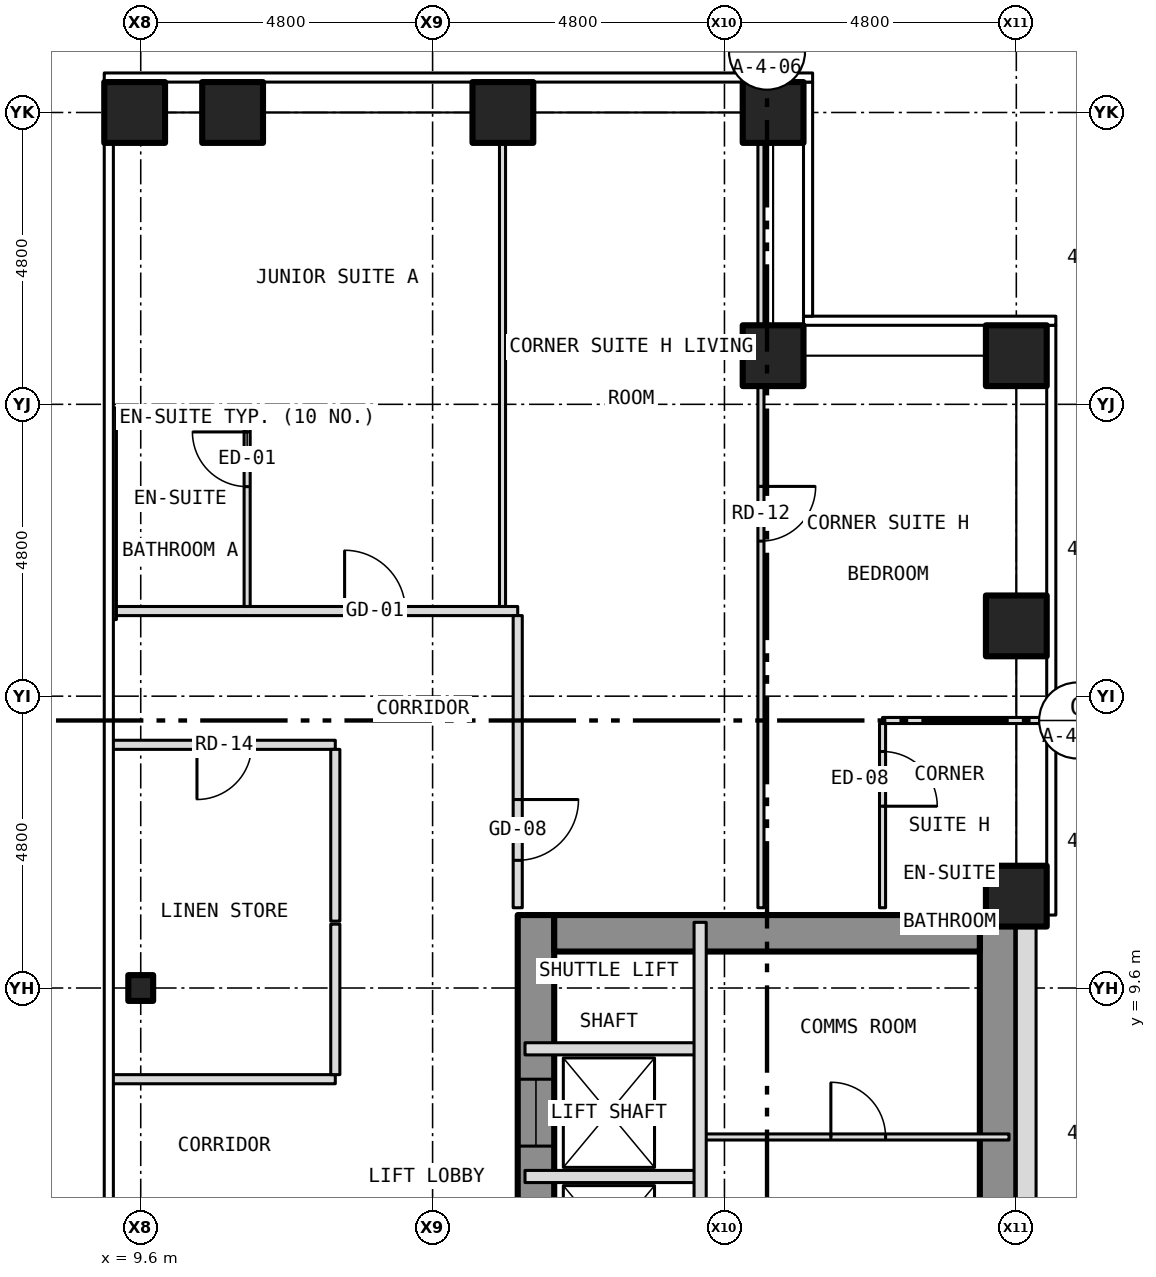
"""IFC4 building model, lengths in metres.
Left out: names, types, materials, properties, quantities, classifications, styles, units other than length and angle.
Written with IfcOpenShell. Run it as: python <this file> out.ifc"""

import sys

from ifc_helpers import new_model, si_unit, direction, frame, frame_2d, origin, origin_2d, place, context, subcontext, project, spatial, rectangle, hollow_rectangle, i_section, extrude, element, fill, save


model = new_model("IFC4")
c1 = context("Model", 3, precision=1e-05, world=origin(), true_north=direction((0.0, 1.0)))
c2 = subcontext(c1, "Body", "Model", "MODEL_VIEW")
j1 = project(units=[si_unit("LENGTHUNIT", "METRE"), si_unit("PLANEANGLEUNIT", "RADIAN")], contexts=[c1])
p1 = place(None, origin())
s1 = spatial("IfcSite", under=j1, at=p1, CompositionType="ELEMENT")
p2 = place(p1, origin())
s2 = spatial("IfcBuilding", under=s1, at=p2, CompositionType="ELEMENT")
p3 = place(p2, frame((0.0, 0.0, 77.5)))
s3 = spatial("IfcBuildingStorey", under=s2, at=p3, CompositionType="ELEMENT", Elevation=77.5)
for number, where, z_axis, x_axis in (
    (1, (11.111, 24.0, -0.15), (0.0, 0.0, 1.0), (1.0, 0.0, 0.0)),
    (2, (15.556, 24.0, -0.15), (0.0, 0.0, 1.0), (1.0, 0.0, 0.0)),
    (3, (20.0, 24.0, -0.15), (0.0, 0.0, 1.0), (1.0, 0.0, 0.0)),
    (4, (24.0, 11.111, -0.15), (0.0, 0.0, 1.0), (1.0, 0.0, 0.0)),
    (5, (24.0, 15.556, -0.15), (0.0, 0.0, 1.0), (1.0, 0.0, 0.0)),
    (6, (24.0, 20.0, -0.15), (0.0, 0.0, 1.0), (1.0, 0.0, 0.0)),
    (7, (20.0, 20.0, -0.15), (0.0, 0.0, 1.0), (1.0, 0.0, 0.0)),
    (8, (9.5, 24.0, -0.15), (0.0, 0.0, 1.0), (1.0, 0.0, 0.0)),
):
    element("IfcColumn", number, at=place(p3, frame(where, z_axis=z_axis, x_axis=x_axis)), inside=s3, PredefinedType="COLUMN", context=c2, shape_type="SweptSolid", body=[
        extrude(hollow_rectangle(XDim=1.0, YDim=1.0, WallThickness=0.06, at=origin_2d()), origin(), (0.0, 0.0, 1.0), 3.5),
    ])
p4 = place(p3, frame((9.6, 9.6, -0.15), z_axis=(0.0, 0.0, 1.0), x_axis=(1.0, 0.0, 0.0)))
e9 = element("IfcColumn", 9, at=p4, inside=s3, PredefinedType="COLUMN", context=c2, shape_type="SweptSolid", body=[
    extrude(i_section(OverallWidth=0.409, OverallDepth=0.424, WebThickness=0.033, FlangeThickness=0.052, at=origin_2d()), origin(), (0.0, 0.0, 1.0), 3.5),
])
p5 = place(p3, frame((16.1, -10.8, 0.0), z_axis=(0.0, 0.0, 1.0), x_axis=(0.0, 1.0, 0.0)))
e10 = element("IfcWall", 10, at=p5, inside=s3, PredefinedType="SHEAR", context=c2, shape_type="SweptSolid", body=[
    extrude(rectangle(XDim=21.6, YDim=0.6, at=frame_2d((10.8, 0.0))), origin(), (0.0, 0.0, 1.0), 3.25),
])
p6 = place(p5, frame((9.4, 0.0, 0.0)))
e11 = element("IfcOpeningElement", 11, at=p6, cuts=e10, PredefinedType="OPENING", context=c2, shape_type="SweptSolid", body=[
    extrude(rectangle(XDim=1.1, YDim=2.1, at=frame_2d((0.55, 1.05))), frame((0.0, 0.312, 0.0), z_axis=(0.0, -1.0, 0.0), x_axis=(1.0, 0.0, 0.0)), (0.0, 0.0, 1.0), 0.624),
])
p7 = place(p5, frame((11.5, 0.0, 0.0)))
e12 = element("IfcOpeningElement", 12, at=p7, cuts=e10, PredefinedType="OPENING", context=c2, shape_type="SweptSolid", body=[
    extrude(rectangle(XDim=1.1, YDim=2.1, at=frame_2d((0.55, 1.05))), frame((0.0, 0.312, 0.0), z_axis=(0.0, -1.0, 0.0), x_axis=(1.0, 0.0, 0.0)), (0.0, 0.0, 1.0), 0.624),
])
p8 = place(p5, frame((13.6, 0.0, 0.0)))
e13 = element("IfcOpeningElement", 13, at=p8, cuts=e10, PredefinedType="OPENING", context=c2, shape_type="SweptSolid", body=[
    extrude(rectangle(XDim=1.1, YDim=2.1, at=frame_2d((0.55, 1.05))), frame((0.0, 0.312, 0.0), z_axis=(0.0, -1.0, 0.0), x_axis=(1.0, 0.0, 0.0)), (0.0, 0.0, 1.0), 0.624),
])
p9 = place(p5, frame((15.7, 0.0, 0.0)))
e14 = element("IfcOpeningElement", 14, at=p9, cuts=e10, PredefinedType="OPENING", context=c2, shape_type="SweptSolid", body=[
    extrude(rectangle(XDim=1.1, YDim=2.1, at=frame_2d((0.55, 1.05))), frame((0.0, 0.312, 0.0), z_axis=(0.0, -1.0, 0.0), x_axis=(1.0, 0.0, 0.0)), (0.0, 0.0, 1.0), 0.624),
])
p10 = place(p5, frame((17.8, 0.0, 0.0)))
e15 = element("IfcOpeningElement", 15, at=p10, cuts=e10, PredefinedType="OPENING", context=c2, shape_type="SweptSolid", body=[
    extrude(rectangle(XDim=1.1, YDim=2.1, at=frame_2d((0.55, 1.05))), frame((0.0, 0.312, 0.0), z_axis=(0.0, -1.0, 0.0), x_axis=(1.0, 0.0, 0.0)), (0.0, 0.0, 1.0), 0.624),
])
p11 = place(p5, frame((5.642, 0.0, 0.0)))
e16 = element("IfcOpeningElement", 16, at=p11, cuts=e10, PredefinedType="OPENING", context=c2, shape_type="SweptSolid", body=[
    extrude(rectangle(XDim=1.1, YDim=2.1, at=frame_2d((0.55, 1.05))), frame((0.0, 0.312, 0.0), z_axis=(0.0, -1.0, 0.0), x_axis=(1.0, 0.0, 0.0)), (0.0, 0.0, 1.0), 0.624),
])
p12 = place(p5, frame((7.5, 0.0, 0.0)))
e17 = element("IfcOpeningElement", 17, at=p12, cuts=e10, PredefinedType="OPENING", context=c2, shape_type="SweptSolid", body=[
    extrude(rectangle(XDim=1.1, YDim=2.1, at=frame_2d((0.55, 1.05))), frame((0.0, 0.312, 0.0), z_axis=(0.0, -1.0, 0.0), x_axis=(1.0, 0.0, 0.0)), (0.0, 0.0, 1.0), 0.624),
])
p13 = place(p3, frame((23.7, -10.8, 0.0), z_axis=(0.0, 0.0, 1.0), x_axis=(0.0, 1.0, 0.0)))
e18 = element("IfcWall", 18, at=p13, inside=s3, PredefinedType="SHEAR", context=c2, shape_type="SweptSolid", body=[
    extrude(rectangle(XDim=21.6, YDim=0.6, at=frame_2d((10.8, 0.0))), origin(), (0.0, 0.0, 1.0), 3.25),
])
p14 = place(p3, frame((16.4, 10.5, 0.0), z_axis=(0.0, 0.0, 1.0), x_axis=(1.0, 0.0, 0.0)))
e19 = element("IfcWall", 19, at=p14, inside=s3, PredefinedType="SHEAR", context=c2, shape_type="SweptSolid", body=[
    extrude(rectangle(XDim=7.0, YDim=0.6, at=frame_2d((3.5, 0.0))), origin(), (0.0, 0.0, 1.0), 3.25),
])
p15 = place(p3, frame((24.163, -10.8, 0.0), z_axis=(0.0, 0.0, 1.0), x_axis=(0.0, 1.0, 0.0)))
e20 = element("IfcWall", 20, at=p15, inside=s3, PredefinedType="SOLIDWALL", context=c2, shape_type="SweptSolid", body=[
    extrude(rectangle(XDim=21.6, YDim=0.325, at=frame_2d((10.8, 0.0))), origin(), (0.0, 0.0, 1.0), 3.5),
])
p16 = place(p15, frame((2.95, 0.0, 1.0)))
e21 = element("IfcOpeningElement", 21, at=p16, cuts=e20, PredefinedType="OPENING", context=c2, shape_type="SweptSolid", body=[
    extrude(rectangle(XDim=0.6, YDim=1.5, at=frame_2d((0.3, 0.75))), frame((0.0, 0.175, 0.0), z_axis=(0.0, -1.0, 0.0), x_axis=(1.0, 0.0, 0.0)), (0.0, 0.0, 1.0), 0.349),
])
p17 = place(p3, frame((15.92, 6.5, 0.0), z_axis=(0.0, 0.0, 1.0), x_axis=(1.0, 0.0, 0.0)))
e22 = element("IfcWall", 22, at=p17, inside=s3, PredefinedType="PARTITIONING", context=c2, shape_type="SweptSolid", body=[
    extrude(rectangle(XDim=2.88, YDim=0.2, at=frame_2d((1.44, 0.0))), origin(), (0.0, 0.0, 1.0), 3.25),
])
p18 = place(p3, frame((18.8, 7.15, 0.0), z_axis=(0.0, 0.0, 1.0), x_axis=(1.0, 0.0, 0.0)))
e23 = element("IfcWall", 23, at=p18, inside=s3, PredefinedType="PARTITIONING", context=c2, shape_type="SweptSolid", body=[
    extrude(rectangle(XDim=5.08, YDim=0.1, at=frame_2d((2.54, 0.0))), origin(), (0.0, 0.0, 1.0), 3.25),
])
p19 = place(p18, frame((2.15, 0.0, 0.0)))
e24 = element("IfcOpeningElement", 24, at=p19, cuts=e23, PredefinedType="OPENING", context=c2, shape_type="SweptSolid", body=[
    extrude(rectangle(XDim=0.9, YDim=2.1, at=frame_2d((0.45, 1.05))), frame((0.0, 0.062, 0.0), z_axis=(0.0, -1.0, 0.0), x_axis=(1.0, 0.0, 0.0)), (0.0, 0.0, 1.0), 0.124),
])
p20 = place(p3, frame((9.12, 8.1, 0.0), z_axis=(0.0, 0.0, 1.0), x_axis=(1.0, 0.0, 0.0)))
e25 = element("IfcWall", 25, at=p20, inside=s3, PredefinedType="PARTITIONING", context=c2, shape_type="SweptSolid", body=[
    extrude(rectangle(XDim=3.68, YDim=0.15, at=frame_2d((1.84, 0.0))), origin(), (0.0, 0.0, 1.0), 3.35),
])
p21 = place(p3, frame((15.92, 8.6, 0.0), z_axis=(0.0, 0.0, 1.0), x_axis=(1.0, 0.0, 0.0)))
e26 = element("IfcWall", 26, at=p21, inside=s3, PredefinedType="PARTITIONING", context=c2, shape_type="SweptSolid", body=[
    extrude(rectangle(XDim=2.88, YDim=0.2, at=frame_2d((1.44, 0.0))), origin(), (0.0, 0.0, 1.0), 3.25),
])
p22 = place(p3, frame((9.12, 13.6, 0.0), z_axis=(0.0, 0.0, 1.0), x_axis=(1.0, 0.0, 0.0)))
e27 = element("IfcWall", 27, at=p22, inside=s3, PredefinedType="PARTITIONING", context=c2, shape_type="SweptSolid", body=[
    extrude(rectangle(XDim=3.68, YDim=0.15, at=frame_2d((1.84, 0.0))), origin(), (0.0, 0.0, 1.0), 3.35),
])
p23 = place(p22, frame((1.405, 0.0, 0.0)))
e28 = element("IfcOpeningElement", 28, at=p23, cuts=e27, PredefinedType="OPENING", context=c2, shape_type="SweptSolid", body=[
    extrude(rectangle(XDim=0.9, YDim=2.1, at=frame_2d((0.45, 1.05))), frame((0.0, 0.087, 0.0), z_axis=(0.0, -1.0, 0.0), x_axis=(1.0, 0.0, 0.0)), (0.0, 0.0, 1.0), 0.174),
])
p24 = place(p3, frame((21.8, 14.0, 0.0), z_axis=(0.0, 0.0, 1.0), x_axis=(1.0, 0.0, 0.0)))
e29 = element("IfcWall", 29, at=p24, inside=s3, PredefinedType="PARTITIONING", context=c2, shape_type="SweptSolid", body=[
    extrude(rectangle(XDim=2.73, YDim=0.1, at=frame_2d((1.365, 0.0))), origin(), (0.0, 0.0, 1.0), 3.35),
])
p25 = place(p3, frame((9.15, 15.8, 0.0), z_axis=(0.0, 0.0, 1.0), x_axis=(1.0, 0.0, 0.0)))
e30 = element("IfcWall", 30, at=p25, inside=s3, PredefinedType="PARTITIONING", context=c2, shape_type="SweptSolid", body=[
    extrude(rectangle(XDim=6.65, YDim=0.15, at=frame_2d((3.325, 0.0))), origin(), (0.0, 0.0, 1.0), 3.35),
])
p26 = place(p25, frame((3.803, 0.0, 0.0)))
e31 = element("IfcOpeningElement", 31, at=p26, cuts=e30, PredefinedType="OPENING", context=c2, shape_type="SweptSolid", body=[
    extrude(rectangle(XDim=1.0, YDim=2.1, at=frame_2d((0.5, 1.05))), frame((0.0, 0.087, 0.0), z_axis=(0.0, -1.0, 0.0), x_axis=(1.0, 0.0, 0.0)), (0.0, 0.0, 1.0), 0.174),
])
p27 = place(p3, frame((9.15, 19.0, 0.0), z_axis=(0.0, 0.0, 1.0), x_axis=(1.0, 0.0, 0.0)))
e32 = element("IfcWall", 32, at=p27, inside=s3, PredefinedType="PARTITIONING", context=c2, shape_type="SweptSolid", body=[
    extrude(rectangle(XDim=2.2, YDim=0.1, at=frame_2d((1.1, 0.0))), origin(), (0.0, 0.0, 1.0), 3.35),
])
p28 = place(p3, frame((9.15, 15.66, 0.0), z_axis=(0.0, 0.0, 1.0), x_axis=(0.0, 1.0, 0.0)))
e33 = element("IfcWall", 33, at=p28, inside=s3, PredefinedType="PARTITIONING", context=c2, shape_type="SweptSolid", body=[
    extrude(rectangle(XDim=3.48, YDim=0.1, at=frame_2d((1.74, 0.0))), origin(), (0.0, 0.0, 1.0), 2.733),
])
p29 = place(p3, frame((11.35, 15.875, 0.0), z_axis=(0.0, 0.0, 1.0), x_axis=(0.0, 1.0, 0.0)))
e34 = element("IfcWall", 34, at=p29, inside=s3, PredefinedType="PARTITIONING", context=c2, shape_type="SweptSolid", body=[
    extrude(rectangle(XDim=3.075, YDim=0.1, at=frame_2d((1.538, 0.0))), origin(), (0.0, 0.0, 1.0), 3.35),
])
p30 = place(p29, frame((1.971, 0.0, 0.0)))
e35 = element("IfcOpeningElement", 35, at=p30, cuts=e34, PredefinedType="OPENING", context=c2, shape_type="SweptSolid", body=[
    extrude(rectangle(XDim=0.9, YDim=2.1, at=frame_2d((0.45, 1.05))), frame((0.0, 0.062, 0.0), z_axis=(0.0, -1.0, 0.0), x_axis=(1.0, 0.0, 0.0)), (0.0, 0.0, 1.0), 0.124),
])
p31 = place(p3, frame((12.8, 8.175, 0.0), z_axis=(0.0, 0.0, 1.0), x_axis=(0.0, 1.0, 0.0)))
e36 = element("IfcWall", 36, at=p31, inside=s3, PredefinedType="PARTITIONING", context=c2, shape_type="SweptSolid", body=[
    extrude(rectangle(XDim=2.475, YDim=0.15, at=frame_2d((1.237, 0.0))), origin(), (0.0, 0.0, 1.0), 3.35),
])
p32 = place(p3, frame((12.8, 10.7, 0.0), z_axis=(0.0, 0.0, 1.0), x_axis=(0.0, 1.0, 0.0)))
e37 = element("IfcWall", 37, at=p32, inside=s3, PredefinedType="PARTITIONING", context=c2, shape_type="SweptSolid", body=[
    extrude(rectangle(XDim=2.825, YDim=0.15, at=frame_2d((1.413, 0.0))), origin(), (0.0, 0.0, 1.0), 3.35),
])
p33 = place(p3, frame((15.55, 15.875, 0.0), z_axis=(0.0, 0.0, 1.0), x_axis=(0.0, 1.0, 0.0)))
e38 = element("IfcWall", 38, at=p33, inside=s3, PredefinedType="PARTITIONING", context=c2, shape_type="SweptSolid", body=[
    extrude(rectangle(XDim=8.005, YDim=0.1, at=frame_2d((4.002, 0.0))), origin(), (0.0, 0.0, 1.0), 3.35),
])
p34 = place(p3, frame((15.8, 10.92, 0.0), z_axis=(0.0, 0.0, 1.0), x_axis=(0.0, 1.0, 0.0)))
e39 = element("IfcWall", 39, at=p34, inside=s3, PredefinedType="PARTITIONING", context=c2, shape_type="SweptSolid", body=[
    extrude(rectangle(XDim=4.805, YDim=0.15, at=frame_2d((2.403, 0.0))), origin(), (0.0, 0.0, 1.0), 3.35),
])
p35 = place(p34, frame((0.78, 0.0, 0.0)))
e40 = element("IfcOpeningElement", 40, at=p35, cuts=e39, PredefinedType="OPENING", context=c2, shape_type="SweptSolid", body=[
    extrude(rectangle(XDim=1.0, YDim=2.1, at=frame_2d((0.5, 1.05))), frame((0.0, 0.087, 0.0), z_axis=(0.0, -1.0, 0.0), x_axis=(1.0, 0.0, 0.0)), (0.0, 0.0, 1.0), 0.174),
])
p36 = place(p3, frame((18.8, -1.8, 0.0), z_axis=(0.0, 0.0, 1.0), x_axis=(0.0, 1.0, 0.0)))
e41 = element("IfcWall", 41, at=p36, inside=s3, PredefinedType="PARTITIONING", context=c2, shape_type="SweptSolid", body=[
    extrude(rectangle(XDim=12.48, YDim=0.2, at=frame_2d((6.24, 0.0))), origin(), (0.0, 0.0, 1.0), 3.25),
])
p37 = place(p3, frame((19.8, 10.92, 0.0), z_axis=(0.0, 0.0, 1.0), x_axis=(0.0, 1.0, 0.0)))
e42 = element("IfcWall", 42, at=p37, inside=s3, PredefinedType="PARTITIONING", context=c2, shape_type="SweptSolid", body=[
    extrude(rectangle(XDim=12.96, YDim=0.1, at=frame_2d((6.48, 0.0))), origin(), (0.0, 0.0, 1.0), 3.35),
])
p38 = place(p37, frame((6.03, 0.0, 0.0)))
e43 = element("IfcOpeningElement", 43, at=p38, cuts=e42, PredefinedType="OPENING", context=c2, shape_type="SweptSolid", body=[
    extrude(rectangle(XDim=0.9, YDim=2.1, at=frame_2d((0.45, 1.05))), frame((0.0, 0.062, 0.0), z_axis=(0.0, -1.0, 0.0), x_axis=(1.0, 0.0, 0.0)), (0.0, 0.0, 1.0), 0.124),
])
p39 = place(p3, frame((21.8, 10.92, 0.0), z_axis=(0.0, 0.0, 1.0), x_axis=(0.0, 1.0, 0.0)))
e44 = element("IfcWall", 44, at=p39, inside=s3, PredefinedType="PARTITIONING", context=c2, shape_type="SweptSolid", body=[
    extrude(rectangle(XDim=3.03, YDim=0.1, at=frame_2d((1.515, 0.0))), origin(), (0.0, 0.0, 1.0), 3.35),
])
p40 = place(p39, frame((1.67, 0.0, 0.0)))
e45 = element("IfcOpeningElement", 45, at=p40, cuts=e44, PredefinedType="OPENING", context=c2, shape_type="SweptSolid", body=[
    extrude(rectangle(XDim=0.9, YDim=2.1, at=frame_2d((0.45, 1.05))), frame((0.0, 0.062, 0.0), z_axis=(0.0, -1.0, 0.0), x_axis=(1.0, 0.0, 0.0)), (0.0, 0.0, 1.0), 0.124),
])
p41 = place(p10, origin())
e46 = element("IfcDoor", 46, at=p41, inside=s3, OperationType="SLIDING_TO_LEFT", PredefinedType="DOOR", context=c2, shape_type="SweptSolid", body=[
    extrude(rectangle(XDim=1.1, YDim=2.1, at=frame_2d((0.55, 1.05))), frame((0.0, 0.025, 0.0), z_axis=(0.0, -1.0, 0.0), x_axis=(1.0, 0.0, 0.0)), (0.0, 0.0, 1.0), 0.05),
])
fill(e15, e46)
p42 = place(p19, origin())
e47 = element("IfcDoor", 47, at=p42, inside=s3, OperationType="SINGLE_SWING_LEFT", PredefinedType="DOOR", context=c2, shape_type="SweptSolid", body=[
    extrude(rectangle(XDim=0.9, YDim=2.1, at=frame_2d((0.45, 1.05))), frame((0.0, 0.025, 0.0), z_axis=(0.0, -1.0, 0.0), x_axis=(1.0, 0.0, 0.0)), (0.0, 0.0, 1.0), 0.05),
])
fill(e24, e47)
p43 = place(p26, origin())
e48 = element("IfcDoor", 48, at=p43, inside=s3, OperationType="SINGLE_SWING_LEFT", PredefinedType="DOOR", context=c2, shape_type="SweptSolid", body=[
    extrude(rectangle(XDim=1.0, YDim=2.1, at=frame_2d((0.5, 1.05))), frame((0.0, 0.025, 0.0), z_axis=(0.0, -1.0, 0.0), x_axis=(1.0, 0.0, 0.0)), (0.0, 0.0, 1.0), 0.05),
])
fill(e31, e48)
p44 = place(p30, origin())
e49 = element("IfcDoor", 49, at=p44, inside=s3, OperationType="SINGLE_SWING_RIGHT", PredefinedType="DOOR", context=c2, shape_type="SweptSolid", body=[
    extrude(rectangle(XDim=0.9, YDim=2.1, at=frame_2d((0.45, 1.05))), frame((0.0, 0.025, 0.0), z_axis=(0.0, -1.0, 0.0), x_axis=(1.0, 0.0, 0.0)), (0.0, 0.0, 1.0), 0.05),
])
fill(e35, e49)
p45 = place(p35, origin())
e50 = element("IfcDoor", 50, at=p45, inside=s3, OperationType="SINGLE_SWING_RIGHT", PredefinedType="DOOR", context=c2, shape_type="SweptSolid", body=[
    extrude(rectangle(XDim=1.0, YDim=2.1, at=frame_2d((0.5, 1.05))), frame((0.0, 0.025, 0.0), z_axis=(0.0, -1.0, 0.0), x_axis=(1.0, 0.0, 0.0)), (0.0, 0.0, 1.0), 0.05),
])
fill(e40, e50)
p46 = place(p38, origin())
e51 = element("IfcDoor", 51, at=p46, inside=s3, OperationType="SINGLE_SWING_RIGHT", PredefinedType="DOOR", context=c2, shape_type="SweptSolid", body=[
    extrude(rectangle(XDim=0.9, YDim=2.1, at=frame_2d((0.45, 1.05))), frame((0.0, 0.025, 0.0), z_axis=(0.0, -1.0, 0.0), x_axis=(1.0, 0.0, 0.0)), (0.0, 0.0, 1.0), 0.05),
])
fill(e43, e51)
p47 = place(p40, origin())
e52 = element("IfcDoor", 52, at=p47, inside=s3, OperationType="SINGLE_SWING_LEFT", PredefinedType="DOOR", context=c2, shape_type="SweptSolid", body=[
    extrude(rectangle(XDim=0.9, YDim=2.1, at=frame_2d((0.45, 1.05))), frame((0.0, 0.025, 0.0), z_axis=(0.0, -1.0, 0.0), x_axis=(1.0, 0.0, 0.0)), (0.0, 0.0, 1.0), 0.05),
])
fill(e45, e52)
p48 = place(p23, origin())
e53 = element("IfcDoor", 53, at=p48, inside=s3, OperationType="SINGLE_SWING_LEFT", PredefinedType="DOOR", context=c2, shape_type="SweptSolid", body=[
    extrude(rectangle(XDim=0.9, YDim=2.1, at=frame_2d((0.45, 1.05))), frame((0.0, 0.025, 0.0), z_axis=(0.0, -1.0, 0.0), x_axis=(1.0, 0.0, 0.0)), (0.0, 0.0, 1.0), 0.05),
])
fill(e28, e53)
save(model, sys.argv[1])
